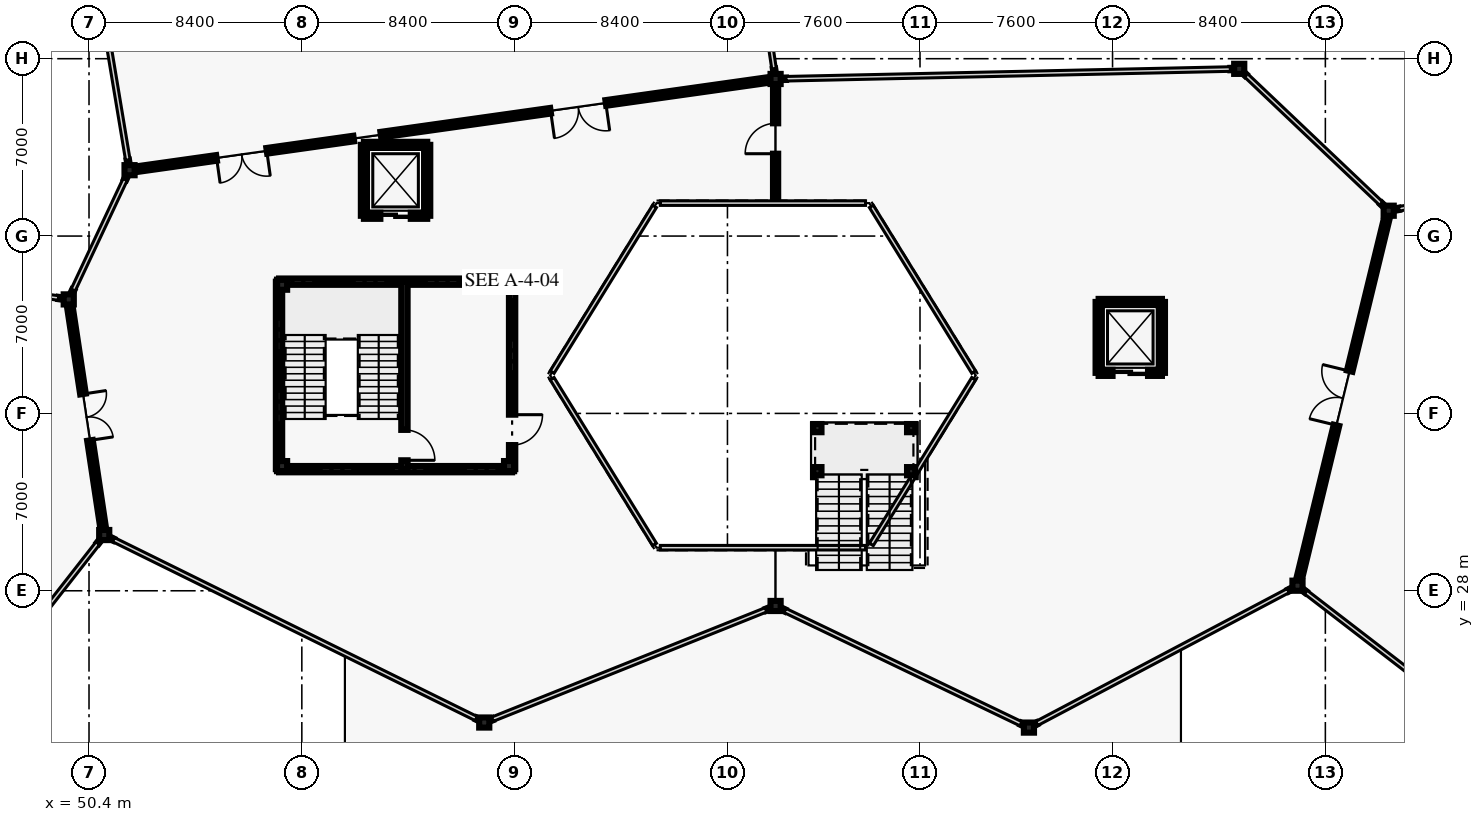
"""IFC4 building model, lengths in metres.
Left out: names, types, materials, properties, quantities, classifications, styles, units other than length and angle.
Written with IfcOpenShell. Run it as: python <this file> out.ifc"""

import sys

from ifc_helpers import new_model, si_unit, direction, frame, frame_2d, origin, origin_2d, place, context, subcontext, project, spatial, rectangle, hollow_circle, i_section, extrude, element, fill, save


model = new_model("IFC4")
c1 = context("Model", 3, precision=1e-05, world=origin(), true_north=direction((0.0, 1.0)))
c2 = subcontext(c1, "Body", "Model", "MODEL_VIEW")
j1 = project(units=[si_unit("LENGTHUNIT", "METRE"), si_unit("PLANEANGLEUNIT", "RADIAN")], contexts=[c1])
p1 = place(None, origin())
s1 = spatial("IfcSite", under=j1, at=p1, CompositionType="ELEMENT")
p2 = place(p1, origin())
s2 = spatial("IfcBuilding", under=s1, at=p2, CompositionType="ELEMENT")
p3 = place(p2, frame((0.0, 0.0, 5.4)))
s3 = spatial("IfcBuildingStorey", under=s2, at=p3, CompositionType="ELEMENT", Elevation=5.4)
for number, where, z_axis, x_axis in (
    (1, (49.6, 39.5, 0.0), (0.0, 0.0, 1.0), (1.0, 0.0, 0.0)),
    (2, (51.0, 30.2, 0.0), (0.0, 0.0, 1.0), (1.0, 0.0, 0.0)),
    (3, (52.0, 44.6, 0.0), (0.0, 0.0, 1.0), (1.0, 0.0, 0.0)),
    (4, (66.0, 22.8, 0.0), (0.0, 0.0, 1.0), (1.0, 0.0, 0.0)),
    (5, (77.5, 27.4, 0.0), (0.0, 0.0, 1.0), (1.0, 0.0, 0.0)),
    (6, (77.5, 48.2, 0.0), (0.0, 0.0, 1.0), (1.0, 0.0, 0.0)),
    (7, (87.5, 22.6, 0.0), (0.0, 0.0, 1.0), (1.0, 0.0, 0.0)),
    (8, (95.8, 48.6, 0.0), (0.0, 0.0, 1.0), (1.0, 0.0, 0.0)),
    (9, (98.1, 28.2, 0.0), (0.0, 0.0, 1.0), (1.0, 0.0, 0.0)),
    (10, (101.7, 43.0, 0.0), (0.0, 0.0, 1.0), (1.0, 0.0, 0.0)),
    (11, (58.02, 32.92, 0.0), (0.0, 0.0, 1.0), (1.0, 0.0, 0.0)),
    (12, (66.98, 32.92, 0.0), (0.0, 0.0, 1.0), (1.0, 0.0, 0.0)),
    (13, (66.98, 40.08, 0.0), (0.0, 0.0, 1.0), (1.0, 0.0, 0.0)),
    (14, (58.02, 40.08, 0.0), (0.0, 0.0, 1.0), (1.0, 0.0, 0.0)),
):
    element("IfcColumn", number, at=place(p3, frame(where, z_axis=z_axis, x_axis=x_axis)), inside=s3, PredefinedType="COLUMN", context=c2, shape_type="SweptSolid", body=[
        extrude(i_section(OverallWidth=0.4, OverallDepth=0.4, WebThickness=0.022, FlangeThickness=0.036, at=origin_2d()), origin(), (0.0, 0.0, 1.0), 4.8),
    ])
for number, where, z_axis, x_axis in (
    (15, (65.962, 22.819, 0.0), (0.0, 0.0, 1.0), (-0.897, 0.442, 0.0)),
    (16, (51.368, 30.018, 0.0), (0.0, 0.0, 1.0), (-0.897, 0.442, 0.0)),
):
    element("IfcWall", number, at=place(p3, frame(where, z_axis=z_axis, x_axis=x_axis)), inside=s3, PredefinedType="SOLIDWALL", context=c2, shape_type="SweptSolid", body=[
        extrude(rectangle(XDim=0.308, YDim=0.095, at=frame_2d((0.154, 0.0))), origin(), (0.0, 0.0, 1.0), 3.62),
    ])
p4 = place(p3, frame((77.405, 27.362, 0.0), z_axis=(0.0, 0.0, 1.0), x_axis=(-0.928967856381, -0.370160400111, 0.0)))
e17 = element("IfcWall", 17, at=p4, inside=s3, PredefinedType="SOLIDWALL", context=c2, shape_type="SweptSolid", body=[
    extrude(rectangle(XDim=0.308, YDim=0.095, at=frame_2d((0.154, 0.0))), origin(), (0.0, 0.0, 1.0), 3.62),
])
p5 = place(p3, frame((66.325, 22.93, 0.0), z_axis=(0.0, 0.0, 1.0), x_axis=(-0.928859130521, -0.370433145989, 0.0)))
e18 = element("IfcWall", 18, at=p5, inside=s3, PredefinedType="SOLIDWALL", context=c2, shape_type="SweptSolid", body=[
    extrude(rectangle(XDim=0.308, YDim=0.095, at=frame_2d((0.154, 0.0))), origin(), (0.0, 0.0, 1.0), 3.62),
])
p6 = place(p3, frame((49.644, 39.592, 0.0), z_axis=(0.0, 0.0, 1.0), x_axis=(0.42457593243, 0.905392333522, 0.0)))
e19 = element("IfcWall", 19, at=p6, inside=s3, PredefinedType="SOLIDWALL", context=c2, shape_type="SweptSolid", body=[
    extrude(rectangle(XDim=0.308, YDim=0.095, at=frame_2d((0.154, 0.0))), origin(), (0.0, 0.0, 1.0), 3.62),
])
p7 = place(p3, frame((51.825, 44.229, 0.0), z_axis=(0.0, 0.0, 1.0), x_axis=(0.425224932958, 0.905087706463, 0.0)))
e20 = element("IfcWall", 20, at=p7, inside=s3, PredefinedType="SOLIDWALL", context=c2, shape_type="SweptSolid", body=[
    extrude(rectangle(XDim=0.308, YDim=0.095, at=frame_2d((0.154, 0.0))), origin(), (0.0, 0.0, 1.0), 3.62),
])
p8 = place(p3, frame((87.462, 22.618, 0.0), z_axis=(0.0, 0.0, 1.0), x_axis=(-0.901906089125, 0.431932178008, 0.0)))
e21 = element("IfcWall", 21, at=p8, inside=s3, PredefinedType="SOLIDWALL", context=c2, shape_type="SweptSolid", body=[
    extrude(rectangle(XDim=0.308, YDim=0.095, at=frame_2d((0.154, 0.0))), origin(), (0.0, 0.0, 1.0), 3.62),
])
p9 = place(p3, frame((77.87, 27.223, 0.0), z_axis=(0.0, 0.0, 1.0), x_axis=(-0.902053790555, 0.431623631126, 0.0)))
e22 = element("IfcWall", 22, at=p9, inside=s3, PredefinedType="SOLIDWALL", context=c2, shape_type="SweptSolid", body=[
    extrude(rectangle(XDim=0.308, YDim=0.095, at=frame_2d((0.154, 0.0))), origin(), (0.0, 0.0, 1.0), 3.62),
])
p10 = place(p3, frame((98.01, 28.152, 0.0), z_axis=(0.0, 0.0, 1.0), x_axis=(-0.885021600209, -0.465549962049, 0.0)))
e23 = element("IfcWall", 23, at=p10, inside=s3, PredefinedType="SOLIDWALL", context=c2, shape_type="SweptSolid", body=[
    extrude(rectangle(XDim=0.307, YDim=0.095, at=frame_2d((0.154, 0.0))), origin(), (0.0, 0.0, 1.0), 3.62),
])
p11 = place(p3, frame((87.809, 22.763, 0.0), z_axis=(0.0, 0.0, 1.0), x_axis=(-0.885348834604, -0.464927350308, 0.0)))
e24 = element("IfcWall", 24, at=p11, inside=s3, PredefinedType="SOLIDWALL", context=c2, shape_type="SweptSolid", body=[
    extrude(rectangle(XDim=0.307, YDim=0.095, at=frame_2d((0.154, 0.0))), origin(), (0.0, 0.0, 1.0), 3.62),
])
for number, where, z_axis, x_axis in (
    (25, (95.83, 48.571, 0.0), (0.0, 0.0, 1.0), (0.726, -0.688, 0.0)),
    (26, (101.403, 43.282, 0.0), (0.0, 0.0, 1.0), (0.726, -0.687, 0.0)),
):
    element("IfcWall", number, at=place(p3, frame(where, z_axis=z_axis, x_axis=x_axis)), inside=s3, PredefinedType="SOLIDWALL", context=c2, shape_type="SweptSolid", body=[
        extrude(rectangle(XDim=0.308, YDim=0.095, at=frame_2d((0.154, 0.0))), origin(), (0.0, 0.0, 1.0), 3.62),
    ])
p12 = place(p3, frame((77.602, 48.202, 0.0), z_axis=(0.0, 0.0, 1.0), x_axis=(0.999735659566, 0.022991541735, 0.0)))
e27 = element("IfcWall", 27, at=p12, inside=s3, PredefinedType="SOLIDWALL", context=c2, shape_type="SweptSolid", body=[
    extrude(rectangle(XDim=0.308, YDim=0.095, at=frame_2d((0.154, 0.0))), origin(), (0.0, 0.0, 1.0), 3.62),
])
for number, where, z_axis, x_axis in (
    (28, (95.45, 48.592, 0.0), (0.0, 0.0, 1.0), (1.0, 0.023, 0.0)),
    (29, (51.983, 44.7, 0.0), (0.0, 0.0, 1.0), (-0.166, 0.986, 0.0)),
):
    element("IfcWall", number, at=place(p3, frame(where, z_axis=z_axis, x_axis=x_axis)), inside=s3, PredefinedType="SOLIDWALL", context=c2, shape_type="SweptSolid", body=[
        extrude(rectangle(XDim=0.308, YDim=0.095, at=frame_2d((0.154, 0.0))), origin(), (0.0, 0.0, 1.0), 3.62),
    ])
p13 = place(p3, frame((77.439, 48.605, 0.0), z_axis=(0.0, 0.0, 1.0), x_axis=(0.15008766182, -0.988672692942, 0.0)))
e30 = element("IfcWall", 30, at=p13, inside=s3, PredefinedType="SOLIDWALL", context=c2, shape_type="SweptSolid", body=[
    extrude(rectangle(XDim=0.307, YDim=0.095, at=frame_2d((0.154, 0.0))), origin(), (0.0, 0.0, 1.0), 3.62),
])
p14 = place(p3, frame((98.424, 27.95, 0.0), z_axis=(0.0, 0.0, 1.0), x_axis=(-0.793861838141, 0.608098168016, 0.0)))
e31 = element("IfcWall", 31, at=p14, inside=s3, PredefinedType="SOLIDWALL", context=c2, shape_type="SweptSolid", body=[
    extrude(rectangle(XDim=0.308, YDim=0.095, at=frame_2d((0.154, 0.0))), origin(), (0.0, 0.0, 1.0), 3.62),
])
p15 = place(p3, frame((101.8, 43.019, 0.0), z_axis=(0.0, 0.0, 1.0), x_axis=(0.983958590936, 0.178397004803, 0.0)))
e32 = element("IfcWall", 32, at=p15, inside=s3, PredefinedType="SOLIDWALL", context=c2, shape_type="SweptSolid", body=[
    extrude(rectangle(XDim=0.308, YDim=0.095, at=frame_2d((0.154, 0.0))), origin(), (0.0, 0.0, 1.0), 3.62),
])
p16 = place(p3, frame((50.937, 30.12, 0.0), z_axis=(0.0, 0.0, 1.0), x_axis=(-0.615582622046, -0.788072354188, 0.0)))
e33 = element("IfcWall", 33, at=p16, inside=s3, PredefinedType="SOLIDWALL", context=c2, shape_type="SweptSolid", body=[
    extrude(rectangle(XDim=0.309, YDim=0.095, at=frame_2d((0.154, 0.0))), origin(), (0.0, 0.0, 1.0), 3.62),
])
p17 = place(p3, frame((49.194, 39.555, 0.0), z_axis=(0.0, 0.0, 1.0), x_axis=(0.991074779294, -0.133307096014, 0.0)))
e34 = element("IfcWall", 34, at=p17, inside=s3, PredefinedType="SOLIDWALL", context=c2, shape_type="SweptSolid", body=[
    extrude(rectangle(XDim=0.308, YDim=0.095, at=frame_2d((0.154, 0.0))), origin(), (0.0, 0.0, 1.0), 3.62),
])
p18 = place(p3, frame((77.5, 43.5, 0.0), z_axis=(0.0, 0.0, 1.0), x_axis=(0.0, 1.0, 0.0)))
e35 = element("IfcWall", 35, at=p18, inside=s3, PredefinedType="SOLIDWALL", context=c2, shape_type="SweptSolid", body=[
    extrude(rectangle(XDim=4.7, YDim=0.205, at=frame_2d((2.35, 0.0))), origin(), (0.0, 0.0, 1.0), 3.32),
])
p19 = place(p18, frame((1.75, 0.0, 0.0)))
e36 = element("IfcOpeningElement", 36, at=p19, cuts=e35, PredefinedType="OPENING", context=c2, shape_type="SweptSolid", body=[
    extrude(rectangle(XDim=1.2, YDim=2.2, at=frame_2d((0.6, 1.1))), frame((0.0, 0.113, 0.0), z_axis=(0.0, -1.0, 0.0), x_axis=(1.0, 0.0, 0.0)), (0.0, 0.0, 1.0), 0.225),
])
p20 = place(p3, frame((77.5, 48.2, 0.0), z_axis=(0.0, 0.0, 1.0), x_axis=(-0.990181159322, -0.139790098807, 0.0)))
e37 = element("IfcWall", 37, at=p20, inside=s3, PredefinedType="SOLIDWALL", context=c2, shape_type="SweptSolid", body=[
    extrude(rectangle(XDim=15.738, YDim=0.225, at=frame_2d((7.869, 0.0))), origin(), (0.0, 0.0, 1.0), 4.02),
])
p21 = place(p20, frame((6.769, 0.0, 0.0)))
e38 = element("IfcOpeningElement", 38, at=p21, cuts=e37, PredefinedType="OPENING", context=c2, shape_type="SweptSolid", body=[
    extrude(rectangle(XDim=2.2, YDim=2.6, at=frame_2d((1.1, 1.3))), frame((0.0, 0.123, 0.0), z_axis=(0.0, -1.0, 0.0), x_axis=(1.0, 0.0, 0.0)), (0.0, 0.0, 1.0), 0.245),
])
p22 = place(p3, frame((60.85, 45.849, 0.0), z_axis=(0.0, 0.0, 1.0), x_axis=(-0.990187360524, -0.139746166523, 0.0)))
e39 = element("IfcWall", 39, at=p22, inside=s3, PredefinedType="SOLIDWALL", context=c2, shape_type="SweptSolid", body=[
    extrude(rectangle(XDim=8.938, YDim=0.225, at=frame_2d((4.469, 0.0))), origin(), (0.0, 0.0, 1.0), 4.02),
])
p23 = place(p22, frame((3.469, 0.0, 0.0)))
e40 = element("IfcOpeningElement", 40, at=p23, cuts=e39, PredefinedType="OPENING", context=c2, shape_type="SweptSolid", body=[
    extrude(rectangle(XDim=2.0, YDim=2.5, at=frame_2d((1.0, 1.25))), frame((0.0, 0.123, 0.0), z_axis=(0.0, -1.0, 0.0), x_axis=(1.0, 0.0, 0.0)), (0.0, 0.0, 1.0), 0.245),
])
p24 = place(p3, frame((49.6, 39.5, 0.0), z_axis=(0.0, 0.0, 1.0), x_axis=(0.148849460064, -0.988859867847, 0.0)))
e41 = element("IfcWall", 41, at=p24, inside=s3, PredefinedType="SOLIDWALL", context=c2, shape_type="SweptSolid", body=[
    extrude(rectangle(XDim=9.405, YDim=0.225, at=frame_2d((4.702, 0.0))), origin(), (0.0, 0.0, 1.0), 4.02),
])
p25 = place(p24, frame((3.777, 0.0, 0.0)))
e42 = element("IfcOpeningElement", 42, at=p25, cuts=e41, PredefinedType="OPENING", context=c2, shape_type="SweptSolid", body=[
    extrude(rectangle(XDim=1.85, YDim=2.4, at=frame_2d((0.925, 1.2))), frame((0.0, 0.123, 0.0), z_axis=(0.0, -1.0, 0.0), x_axis=(1.0, 0.0, 0.0)), (0.0, 0.0, 1.0), 0.245),
])
p26 = place(p3, frame((98.1, 28.2, 0.0), z_axis=(0.0, 0.0, 1.0), x_axis=(0.236341762997, 0.971669990822, 0.0)))
e43 = element("IfcWall", 43, at=p26, inside=s3, PredefinedType="SOLIDWALL", context=c2, shape_type="SweptSolid", body=[
    extrude(rectangle(XDim=15.231, YDim=0.225, at=frame_2d((7.616, 0.0))), origin(), (0.0, 0.0, 1.0), 4.02),
])
p27 = place(p26, frame((6.516, 0.0, 0.0)))
e44 = element("IfcOpeningElement", 44, at=p27, cuts=e43, PredefinedType="OPENING", context=c2, shape_type="SweptSolid", body=[
    extrude(rectangle(XDim=2.2, YDim=2.6, at=frame_2d((1.1, 1.3))), frame((0.0, 0.123, 0.0), z_axis=(0.0, -1.0, 0.0), x_axis=(1.0, 0.0, 0.0)), (0.0, 0.0, 1.0), 0.245),
])
p28 = place(p3, frame((57.9, 32.8, 0.0), z_axis=(0.0, 0.0, 1.0), x_axis=(0.0, 1.0, 0.0)))
e45 = element("IfcWall", 45, at=p28, inside=s3, PredefinedType="SHEAR", context=c2, shape_type="SweptSolid", body=[
    extrude(rectangle(XDim=7.4, YDim=0.25, at=frame_2d((3.7, 0.0))), origin(), (0.0, 0.0, 1.0), 4.56),
])
for number, where, z_axis, x_axis in (
    (46, (57.9, 40.2, 0.0), (0.0, 0.0, 1.0), (1.0, 0.0, 0.0)),
    (47, (67.1, 32.8, 0.0), (0.0, 0.0, 1.0), (-1.0, 0.0, 0.0)),
):
    element("IfcWall", number, at=place(p3, frame(where, z_axis=z_axis, x_axis=x_axis)), inside=s3, PredefinedType="SHEAR", context=c2, shape_type="SweptSolid", body=[
        extrude(rectangle(XDim=9.2, YDim=0.25, at=frame_2d((4.6, 0.0))), origin(), (0.0, 0.0, 1.0), 4.56),
    ])
p29 = place(p3, frame((67.1, 40.2, 0.0), z_axis=(0.0, 0.0, 1.0), x_axis=(0.0, -1.0, 0.0)))
e48 = element("IfcWall", 48, at=p29, inside=s3, PredefinedType="SHEAR", context=c2, shape_type="SweptSolid", body=[
    extrude(rectangle(XDim=7.4, YDim=0.25, at=frame_2d((3.7, 0.0))), origin(), (0.0, 0.0, 1.0), 4.56),
])
p30 = place(p29, frame((5.25, 0.0, 0.0)))
e49 = element("IfcOpeningElement", 49, at=p30, cuts=e48, PredefinedType="OPENING", context=c2, shape_type="SweptSolid", body=[
    extrude(rectangle(XDim=1.2, YDim=2.2, at=frame_2d((0.6, 1.1))), frame((0.0, 0.135, 0.0), z_axis=(0.0, -1.0, 0.0), x_axis=(1.0, 0.0, 0.0)), (0.0, 0.0, 1.0), 0.27),
])
p31 = place(p3, frame((62.85, 40.2, 0.0), z_axis=(0.0, 0.0, 1.0), x_axis=(0.0, -1.0, 0.0)))
e50 = element("IfcWall", 50, at=p31, inside=s3, PredefinedType="SHEAR", context=c2, shape_type="SweptSolid", body=[
    extrude(rectangle(XDim=7.4, YDim=0.25, at=frame_2d((3.7, 0.0))), origin(), (0.0, 0.0, 1.0), 4.56),
])
p32 = place(p31, frame((5.85, 0.0, 0.0)))
e51 = element("IfcOpeningElement", 51, at=p32, cuts=e50, PredefinedType="OPENING", context=c2, shape_type="SweptSolid", body=[
    extrude(rectangle(XDim=1.2, YDim=2.2, at=frame_2d((0.6, 1.1))), frame((0.0, 0.135, 0.0), z_axis=(0.0, -1.0, 0.0), x_axis=(1.0, 0.0, 0.0)), (0.0, 0.0, 1.0), 0.27),
])
for number, where, z_axis, x_axis in (
    (52, (79.15, 32.72, 0.0), (0.0, 0.0, 1.0), (1.0, 0.0, 0.0)),
    (53, (82.85, 32.72, 0.0), (0.0, 0.0, 1.0), (1.0, 0.0, 0.0)),
    (54, (79.15, 34.42, 0.0), (0.0, 0.0, 1.0), (1.0, 0.0, 0.0)),
    (55, (82.85, 34.42, 0.0), (0.0, 0.0, 1.0), (1.0, 0.0, 0.0)),
):
    element("IfcColumn", number, at=place(p3, frame(where, z_axis=z_axis, x_axis=x_axis)), inside=s3, PredefinedType="COLUMN", context=c2, shape_type="SweptSolid", body=[
        extrude(hollow_circle(Radius=0.162, WallThickness=0.01, at=origin_2d()), origin(), (0.0, 0.0, 1.0), 4.8),
    ])
p33 = place(p3, frame((61.25, 45.6, 0.0), z_axis=(0.0, 0.0, 1.0), x_axis=(1.0, 0.0, 0.0)))
e56 = element("IfcWall", 56, at=p33, inside=s3, PredefinedType="SHEAR", context=c2, shape_type="SweptSolid", body=[
    extrude(rectangle(XDim=2.5, YDim=0.24, at=frame_2d((1.25, 0.0))), origin(), (0.0, 0.0, 1.0), 4.56),
])
for number, where, z_axis, x_axis in (
    (57, (63.75, 45.6, 0.0), (0.0, 0.0, 1.0), (0.0, -1.0, 0.0)),
    (58, (61.25, 42.8, 0.0), (0.0, 0.0, 1.0), (0.0, 1.0, 0.0)),
):
    element("IfcWall", number, at=place(p3, frame(where, z_axis=z_axis, x_axis=x_axis)), inside=s3, PredefinedType="SHEAR", context=c2, shape_type="SweptSolid", body=[
        extrude(rectangle(XDim=2.8, YDim=0.24, at=frame_2d((1.4, 0.0))), origin(), (0.0, 0.0, 1.0), 4.56),
    ])
p34 = place(p3, frame((63.75, 42.8, 0.0), z_axis=(0.0, 0.0, 1.0), x_axis=(-1.0, 0.0, 0.0)))
e59 = element("IfcWall", 59, at=p34, inside=s3, PredefinedType="SHEAR", context=c2, shape_type="SweptSolid", body=[
    extrude(rectangle(XDim=2.5, YDim=0.24, at=frame_2d((1.25, 0.0))), origin(), (0.0, 0.0, 1.0), 4.56),
])
p35 = place(p34, frame((0.65, 0.0, 0.0)))
e60 = element("IfcOpeningElement", 60, at=p35, cuts=e59, PredefinedType="OPENING", context=c2, shape_type="SweptSolid", body=[
    extrude(rectangle(XDim=1.2, YDim=2.2, at=frame_2d((0.6, 1.1))), frame((0.0, 0.13, 0.0), z_axis=(0.0, -1.0, 0.0), x_axis=(1.0, 0.0, 0.0)), (0.0, 0.0, 1.0), 0.26),
])
p36 = place(p3, frame((90.25, 39.4, 0.0), z_axis=(0.0, 0.0, 1.0), x_axis=(1.0, 0.0, 0.0)))
e61 = element("IfcWall", 61, at=p36, inside=s3, PredefinedType="SHEAR", context=c2, shape_type="SweptSolid", body=[
    extrude(rectangle(XDim=2.5, YDim=0.24, at=frame_2d((1.25, 0.0))), origin(), (0.0, 0.0, 1.0), 4.56),
])
for number, where, z_axis, x_axis in (
    (62, (92.75, 39.4, 0.0), (0.0, 0.0, 1.0), (0.0, -1.0, 0.0)),
    (63, (90.25, 36.6, 0.0), (0.0, 0.0, 1.0), (0.0, 1.0, 0.0)),
):
    element("IfcWall", number, at=place(p3, frame(where, z_axis=z_axis, x_axis=x_axis)), inside=s3, PredefinedType="SHEAR", context=c2, shape_type="SweptSolid", body=[
        extrude(rectangle(XDim=2.8, YDim=0.24, at=frame_2d((1.4, 0.0))), origin(), (0.0, 0.0, 1.0), 4.56),
    ])
p37 = place(p3, frame((92.75, 36.6, 0.0), z_axis=(0.0, 0.0, 1.0), x_axis=(-1.0, 0.0, 0.0)))
e64 = element("IfcWall", 64, at=p37, inside=s3, PredefinedType="SHEAR", context=c2, shape_type="SweptSolid", body=[
    extrude(rectangle(XDim=2.5, YDim=0.24, at=frame_2d((1.25, 0.0))), origin(), (0.0, 0.0, 1.0), 4.56),
])
p38 = place(p37, frame((0.55, 0.0, 0.0)))
e65 = element("IfcOpeningElement", 65, at=p38, cuts=e64, PredefinedType="OPENING", context=c2, shape_type="SweptSolid", body=[
    extrude(rectangle(XDim=1.4, YDim=2.3, at=frame_2d((0.7, 1.15))), frame((0.0, 0.13, 0.0), z_axis=(0.0, -1.0, 0.0), x_axis=(1.0, 0.0, 0.0)), (0.0, 0.0, 1.0), 0.26),
])
p39 = place(p19, origin())
e66 = element("IfcDoor", 66, at=p39, inside=s3, OperationType="SINGLE_SWING_LEFT", PredefinedType="DOOR", context=c2, shape_type="SweptSolid", body=[
    extrude(rectangle(XDim=1.2, YDim=2.2, at=frame_2d((0.6, 1.1))), frame((0.0, 0.025, 0.0), z_axis=(0.0, -1.0, 0.0), x_axis=(1.0, 0.0, 0.0)), (0.0, 0.0, 1.0), 0.05),
])
fill(e36, e66)
p40 = place(p21, origin())
e67 = element("IfcDoor", 67, at=p40, inside=s3, OperationType="DOUBLE_DOOR_SINGLE_SWING", PredefinedType="DOOR", context=c2, shape_type="SweptSolid", body=[
    extrude(rectangle(XDim=2.2, YDim=2.6, at=frame_2d((1.1, 1.3))), frame((0.0, 0.025, 0.0), z_axis=(0.0, -1.0, 0.0), x_axis=(1.0, 0.0, 0.0)), (0.0, 0.0, 1.0), 0.05),
])
fill(e38, e67)
p41 = place(p23, origin())
e68 = element("IfcDoor", 68, at=p41, inside=s3, OperationType="DOUBLE_DOOR_SINGLE_SWING", PredefinedType="DOOR", context=c2, shape_type="SweptSolid", body=[
    extrude(rectangle(XDim=2.0, YDim=2.5, at=frame_2d((1.0, 1.25))), frame((0.0, 0.025, 0.0), z_axis=(0.0, -1.0, 0.0), x_axis=(1.0, 0.0, 0.0)), (0.0, 0.0, 1.0), 0.05),
])
fill(e40, e68)
p42 = place(p25, origin())
e69 = element("IfcDoor", 69, at=p42, inside=s3, OperationType="DOUBLE_DOOR_SINGLE_SWING", PredefinedType="DOOR", context=c2, shape_type="SweptSolid", body=[
    extrude(rectangle(XDim=1.85, YDim=2.4, at=frame_2d((0.925, 1.2))), frame((0.0, 0.025, 0.0), z_axis=(0.0, -1.0, 0.0), x_axis=(1.0, 0.0, 0.0)), (0.0, 0.0, 1.0), 0.05),
])
fill(e42, e69)
p43 = place(p27, origin())
e70 = element("IfcDoor", 70, at=p43, inside=s3, OperationType="DOUBLE_DOOR_SINGLE_SWING", PredefinedType="DOOR", context=c2, shape_type="SweptSolid", body=[
    extrude(rectangle(XDim=2.2, YDim=2.6, at=frame_2d((1.1, 1.3))), frame((0.0, 0.025, 0.0), z_axis=(0.0, -1.0, 0.0), x_axis=(1.0, 0.0, 0.0)), (0.0, 0.0, 1.0), 0.05),
])
fill(e44, e70)
p44 = place(p30, origin())
e71 = element("IfcDoor", 71, at=p44, inside=s3, OperationType="SINGLE_SWING_LEFT", PredefinedType="DOOR", context=c2, shape_type="SweptSolid", body=[
    extrude(rectangle(XDim=1.2, YDim=2.2, at=frame_2d((0.6, 1.1))), frame((0.0, 0.025, 0.0), z_axis=(0.0, -1.0, 0.0), x_axis=(1.0, 0.0, 0.0)), (0.0, 0.0, 1.0), 0.05),
])
fill(e49, e71)
p45 = place(p32, origin())
e72 = element("IfcDoor", 72, at=p45, inside=s3, OperationType="SINGLE_SWING_RIGHT", PredefinedType="DOOR", context=c2, shape_type="SweptSolid", body=[
    extrude(rectangle(XDim=1.2, YDim=2.2, at=frame_2d((0.6, 1.1))), frame((0.0, 0.025, 0.0), z_axis=(0.0, -1.0, 0.0), x_axis=(1.0, 0.0, 0.0)), (0.0, 0.0, 1.0), 0.05),
])
fill(e51, e72)
p46 = place(p35, origin())
e73 = element("IfcDoor", 73, at=p46, inside=s3, OperationType="SLIDING_TO_LEFT", PredefinedType="DOOR", context=c2, shape_type="SweptSolid", body=[
    extrude(rectangle(XDim=1.2, YDim=2.2, at=frame_2d((0.6, 1.1))), frame((0.0, 0.025, 0.0), z_axis=(0.0, -1.0, 0.0), x_axis=(1.0, 0.0, 0.0)), (0.0, 0.0, 1.0), 0.05),
])
fill(e60, e73)
p47 = place(p38, origin())
e74 = element("IfcDoor", 74, at=p47, inside=s3, OperationType="SLIDING_TO_LEFT", PredefinedType="DOOR", context=c2, shape_type="SweptSolid", body=[
    extrude(rectangle(XDim=1.4, YDim=2.3, at=frame_2d((0.7, 1.15))), frame((0.0, 0.025, 0.0), z_axis=(0.0, -1.0, 0.0), x_axis=(1.0, 0.0, 0.0)), (0.0, 0.0, 1.0), 0.05),
])
fill(e65, e74)
save(model, sys.argv[1])
